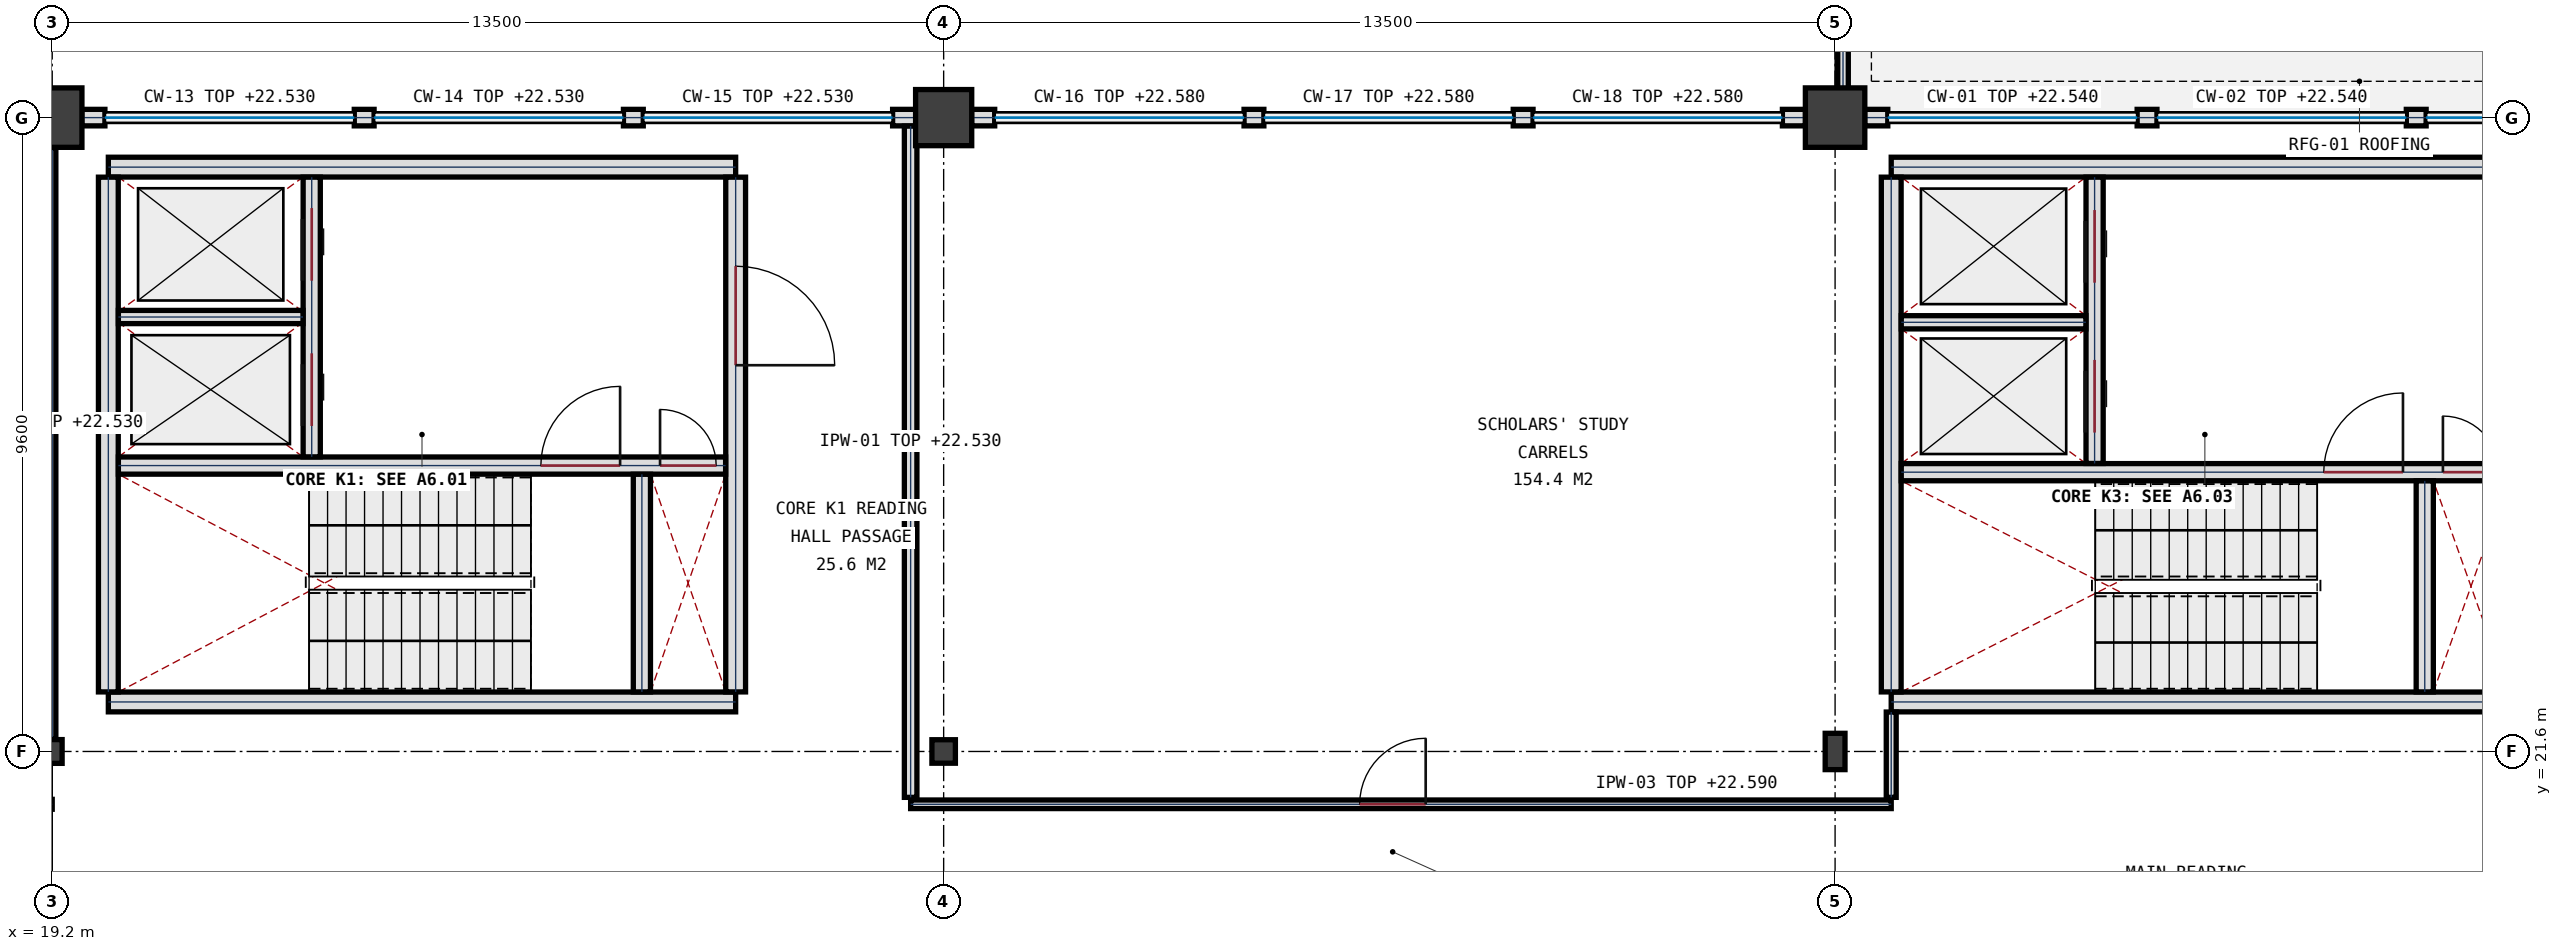
"""IFC4 building model, lengths in metres.
Left out: names, types, materials, properties, quantities, classifications, styles, units other than length and angle.
Written with IfcOpenShell. Run it as: python <this file> out.ifc"""

import sys

from ifc_helpers import new_model, si_unit, direction, frame, frame_2d, origin, origin_2d, place, context, subcontext, project, spatial, rectangle, circle, hollow_circle, i_section, extrude, element, fill, save


model = new_model("IFC4")
c1 = context("Model", 3, precision=1e-05, world=origin(), true_north=direction((0.0, 1.0)))
c2 = subcontext(c1, "Body", "Model", "MODEL_VIEW")
j1 = project(units=[si_unit("LENGTHUNIT", "METRE"), si_unit("PLANEANGLEUNIT", "RADIAN")], contexts=[c1])
p1 = place(None, origin())
s1 = spatial("IfcSite", under=j1, at=p1, CompositionType="ELEMENT")
p2 = place(p1, origin())
s2 = spatial("IfcBuilding", under=s1, at=p2, CompositionType="ELEMENT")
p3 = place(p2, frame((0.0, 0.0, 18.9)))
s3 = spatial("IfcBuildingStorey", under=s2, at=p3, CompositionType="ELEMENT", Elevation=18.9)
p4 = place(p3, frame((19.2, 21.6, 0.0), z_axis=(0.0, 0.0, 1.0), x_axis=(1.0, 0.0, 0.0)))
e1 = element("IfcColumn", 1, at=p4, inside=s3, PredefinedType="COLUMN", context=c2, shape_type="SweptSolid", body=[
    extrude(i_section(OverallWidth=0.3, OverallDepth=0.36, WebThickness=0.012, FlangeThickness=0.022, FilletRadius=0.027, at=origin_2d()), origin(), (0.0, 0.0, 1.0), 4.5),
])
p5 = place(p3, frame((19.2, 31.2, 0.0), z_axis=(0.0, 0.0, 1.0), x_axis=(1.0, 0.0, 0.0)))
e2 = element("IfcColumn", 2, at=p5, inside=s3, PredefinedType="COLUMN", context=c2, shape_type="SweptSolid", body=[
    extrude(circle(Radius=0.45, at=origin_2d()), origin(), (0.0, 0.0, 1.0), 4.5),
])
p6 = place(p3, frame((32.7, 21.6, 0.0), z_axis=(0.0, 0.0, 1.0), x_axis=(1.0, 0.0, 0.0)))
e3 = element("IfcColumn", 3, at=p6, inside=s3, PredefinedType="COLUMN", context=c2, shape_type="SweptSolid", body=[
    extrude(hollow_circle(Radius=0.178, WallThickness=0.014, at=origin_2d()), origin(), (0.0, 0.0, 1.0), 4.5),
])
p7 = place(p3, frame((32.7, 31.2, 0.0), z_axis=(0.0, 0.0, 1.0), x_axis=(1.0, 0.0, 0.0)))
e4 = element("IfcColumn", 4, at=p7, inside=s3, PredefinedType="COLUMN", context=c2, shape_type="SweptSolid", body=[
    extrude(rectangle(XDim=0.85, YDim=0.85, at=origin_2d()), origin(), (0.0, 0.0, 1.0), 4.5),
])
p8 = place(p3, frame((46.2, 21.6, 0.0), z_axis=(0.0, 0.0, 1.0), x_axis=(1.0, 0.0, 0.0)))
e5 = element("IfcColumn", 5, at=p8, inside=s3, PredefinedType="COLUMN", context=c2, shape_type="SweptSolid", body=[
    extrude(i_section(OverallWidth=0.3, OverallDepth=0.55, WebThickness=0.015, FlangeThickness=0.029, FilletRadius=0.027, at=origin_2d()), origin(), (0.0, 0.0, 1.0), 4.5),
])
p9 = place(p3, frame((46.2, 31.2, 0.0), z_axis=(0.0, 0.0, 1.0), x_axis=(1.0, 0.0, 0.0)))
e6 = element("IfcColumn", 6, at=p9, inside=s3, PredefinedType="COLUMN", context=c2, shape_type="SweptSolid", body=[
    extrude(circle(Radius=0.45, at=origin_2d()), origin(), (0.0, 0.0, 1.0), 4.5),
])
for number, where, z_axis, x_axis in (
    (7, (19.648, 31.2, 0.0), (0.0, 0.0, 1.0), (1.0, 0.0, 0.0)),
    (8, (31.927, 31.2, 0.0), (0.0, 0.0, 1.0), (1.0, 0.0, 0.0)),
):
    element("IfcWall", number, at=place(p3, frame(where, z_axis=z_axis, x_axis=x_axis)), inside=s3, PredefinedType="SOLIDWALL", context=c2, shape_type="SweptSolid", body=[
        extrude(rectangle(XDim=0.35, YDim=0.25, at=frame_2d((0.175, 0.0))), origin(), (0.0, 0.0, 1.0), 3.63),
    ])
p10 = place(p3, frame((23.774, 31.2, 0.0), z_axis=(0.0, 0.0, 1.0), x_axis=(1.0, 0.0, 0.0)))
e9 = element("IfcWall", 9, at=p10, inside=s3, PredefinedType="SOLIDWALL", context=c2, shape_type="SweptSolid", body=[
    extrude(rectangle(XDim=0.3, YDim=0.25, at=frame_2d((0.15, 0.0))), origin(), (0.0, 0.0, 1.0), 3.63),
])
p11 = place(p3, frame((27.851, 31.2, 0.0), z_axis=(0.0, 0.0, 1.0), x_axis=(1.0, 0.0, 0.0)))
e10 = element("IfcWall", 10, at=p11, inside=s3, PredefinedType="SOLIDWALL", context=c2, shape_type="SweptSolid", body=[
    extrude(rectangle(XDim=0.3, YDim=0.25, at=frame_2d((0.15, 0.0))), origin(), (0.0, 0.0, 1.0), 3.63),
])
for number, where, z_axis, x_axis in (
    (11, (33.123, 31.2, 0.0), (0.0, 0.0, 1.0), (1.0, 0.0, 0.0)),
    (12, (45.402, 31.2, 0.0), (0.0, 0.0, 1.0), (1.0, 0.0, 0.0)),
):
    element("IfcWall", number, at=place(p3, frame(where, z_axis=z_axis, x_axis=x_axis)), inside=s3, PredefinedType="SOLIDWALL", context=c2, shape_type="SweptSolid", body=[
        extrude(rectangle(XDim=0.35, YDim=0.25, at=frame_2d((0.175, 0.0))), origin(), (0.0, 0.0, 1.0), 3.68),
    ])
for number, where, z_axis, x_axis in (
    (13, (37.249, 31.2, 0.0), (0.0, 0.0, 1.0), (1.0, 0.0, 0.0)),
    (14, (41.326, 31.2, 0.0), (0.0, 0.0, 1.0), (1.0, 0.0, 0.0)),
):
    element("IfcWall", number, at=place(p3, frame(where, z_axis=z_axis, x_axis=x_axis)), inside=s3, PredefinedType="SOLIDWALL", context=c2, shape_type="SweptSolid", body=[
        extrude(rectangle(XDim=0.3, YDim=0.25, at=frame_2d((0.15, 0.0))), origin(), (0.0, 0.0, 1.0), 3.68),
    ])
p12 = place(p3, frame((46.648, 31.2, 0.0), z_axis=(0.0, 0.0, 1.0), x_axis=(1.0, 0.0, 0.0)))
e15 = element("IfcWall", 15, at=p12, inside=s3, PredefinedType="SOLIDWALL", context=c2, shape_type="SweptSolid", body=[
    extrude(rectangle(XDim=0.35, YDim=0.25, at=frame_2d((0.175, 0.0))), origin(), (0.0, 0.0, 1.0), 3.64),
])
p13 = place(p3, frame((50.774, 31.2, 0.0), z_axis=(0.0, 0.0, 1.0), x_axis=(1.0, 0.0, 0.0)))
e16 = element("IfcWall", 16, at=p13, inside=s3, PredefinedType="SOLIDWALL", context=c2, shape_type="SweptSolid", body=[
    extrude(rectangle(XDim=0.3, YDim=0.25, at=frame_2d((0.15, 0.0))), origin(), (0.0, 0.0, 1.0), 3.64),
])
p14 = place(p3, frame((54.851, 31.2, 0.0), z_axis=(0.0, 0.0, 1.0), x_axis=(1.0, 0.0, 0.0)))
e17 = element("IfcWall", 17, at=p14, inside=s3, PredefinedType="SOLIDWALL", context=c2, shape_type="SweptSolid", body=[
    extrude(rectangle(XDim=0.3, YDim=0.25, at=frame_2d((0.15, 0.0))), origin(), (0.0, 0.0, 1.0), 3.64),
])
p15 = place(p3, frame((46.32, 31.5, 0.0), z_axis=(0.0, 0.0, 1.0), x_axis=(0.0, 1.0, 0.0)))
e18 = element("IfcWall", 18, at=p15, inside=s3, PredefinedType="PARAPET", context=c2, shape_type="SweptSolid", body=[
    extrude(rectangle(XDim=16.2, YDim=0.16, at=frame_2d((8.1, 0.0))), origin(), (0.0, 0.0, 1.0), 1.15),
])
for number, where, z_axis, x_axis in (
    (19, (29.55, 22.35, 0.0), (0.0, 0.0, 1.0), (-1.0, 0.0, 0.0)),
    (20, (20.05, 30.45, 0.0), (0.0, 0.0, 1.0), (1.0, 0.0, 0.0)),
):
    element("IfcWall", number, at=place(p3, frame(where, z_axis=z_axis, x_axis=x_axis)), inside=s3, PredefinedType="SHEAR", context=c2, shape_type="SweptSolid", body=[
        extrude(rectangle(XDim=9.5, YDim=0.3, at=frame_2d((4.75, 0.0))), origin(), (0.0, 0.0, 1.0), 4.5),
    ])
p16 = place(p3, frame((20.05, 22.502, 0.0), z_axis=(0.0, 0.0, 1.0), x_axis=(0.0, 1.0, 0.0)))
e21 = element("IfcWall", 21, at=p16, inside=s3, PredefinedType="SHEAR", context=c2, shape_type="SweptSolid", body=[
    extrude(rectangle(XDim=7.796, YDim=0.3, at=frame_2d((3.898, 0.0))), origin(), (0.0, 0.0, 1.0), 4.5),
])
p17 = place(p3, frame((29.55, 30.298, 0.0), z_axis=(0.0, 0.0, 1.0), x_axis=(0.0, -1.0, 0.0)))
e22 = element("IfcWall", 22, at=p17, inside=s3, PredefinedType="SHEAR", context=c2, shape_type="SweptSolid", body=[
    extrude(rectangle(XDim=7.796, YDim=0.3, at=frame_2d((3.898, 0.0))), origin(), (0.0, 0.0, 1.0), 4.5),
])
p18 = place(p17, frame((1.348, 0.0, 0.0)))
e23 = element("IfcOpeningElement", 23, at=p18, cuts=e22, PredefinedType="OPENING", context=c2, shape_type="SweptSolid", body=[
    extrude(rectangle(XDim=1.5, YDim=2.25, at=frame_2d((0.75, 1.125))), frame((0.0, 0.16, 0.0), z_axis=(0.0, -1.0, 0.0), x_axis=(1.0, 0.0, 0.0)), (0.0, 0.0, 1.0), 0.32),
])
p19 = place(p3, frame((20.202, 25.93, 0.0), z_axis=(0.0, 0.0, 1.0), x_axis=(1.0, 0.0, 0.0)))
e24 = element("IfcWall", 24, at=p19, inside=s3, PredefinedType="SHEAR", context=c2, shape_type="SweptSolid", body=[
    extrude(rectangle(XDim=9.196, YDim=0.26, at=frame_2d((4.598, 0.0))), origin(), (0.0, 0.0, 1.0), 4.5),
])
p20 = place(p19, frame((6.398, 0.0, 0.0)))
e25 = element("IfcOpeningElement", 25, at=p20, cuts=e24, PredefinedType="OPENING", context=c2, shape_type="SweptSolid", body=[
    extrude(rectangle(XDim=1.2, YDim=2.2, at=frame_2d((0.6, 1.1))), frame((0.0, 0.14, 0.0), z_axis=(0.0, -1.0, 0.0), x_axis=(1.0, 0.0, 0.0)), (0.0, 0.0, 1.0), 0.28),
])
p21 = place(p19, frame((8.203, 0.0, 0.0)))
e26 = element("IfcOpeningElement", 26, at=p21, cuts=e24, PredefinedType="OPENING", context=c2, shape_type="SweptSolid", body=[
    extrude(rectangle(XDim=0.85, YDim=2.05, at=frame_2d((0.425, 1.025))), frame((0.0, 0.14, 0.0), z_axis=(0.0, -1.0, 0.0), x_axis=(1.0, 0.0, 0.0)), (0.0, 0.0, 1.0), 0.28),
])
p22 = place(p3, frame((28.13, 22.502, 0.0), z_axis=(0.0, 0.0, 1.0), x_axis=(0.0, 1.0, 0.0)))
e27 = element("IfcWall", 27, at=p22, inside=s3, PredefinedType="SHEAR", context=c2, shape_type="SweptSolid", body=[
    extrude(rectangle(XDim=3.296, YDim=0.26, at=frame_2d((1.648, 0.0))), origin(), (0.0, 0.0, 1.0), 4.5),
])
p23 = place(p3, frame((23.13, 26.062, 0.0), z_axis=(0.0, 0.0, 1.0), x_axis=(0.0, 1.0, 0.0)))
e28 = element("IfcWall", 28, at=p23, inside=s3, PredefinedType="SHEAR", context=c2, shape_type="SweptSolid", body=[
    extrude(rectangle(XDim=4.236, YDim=0.26, at=frame_2d((2.118, 0.0))), origin(), (0.0, 0.0, 1.0), 4.5),
])
p24 = place(p23, frame((0.468, 0.0, 0.0)))
e29 = element("IfcOpeningElement", 29, at=p24, cuts=e28, PredefinedType="OPENING", context=c2, shape_type="SweptSolid", body=[
    extrude(rectangle(XDim=1.1, YDim=2.15, at=frame_2d((0.55, 1.075))), frame((0.0, 0.14, 0.0), z_axis=(0.0, -1.0, 0.0), x_axis=(1.0, 0.0, 0.0)), (0.0, 0.0, 1.0), 0.28),
])
p25 = place(p23, frame((2.668, 0.0, 0.0)))
e30 = element("IfcOpeningElement", 30, at=p25, cuts=e28, PredefinedType="OPENING", context=c2, shape_type="SweptSolid", body=[
    extrude(rectangle(XDim=1.1, YDim=2.15, at=frame_2d((0.55, 1.075))), frame((0.0, 0.14, 0.0), z_axis=(0.0, -1.0, 0.0), x_axis=(1.0, 0.0, 0.0)), (0.0, 0.0, 1.0), 0.28),
])
p26 = place(p3, frame((20.202, 28.18, 0.0), z_axis=(0.0, 0.0, 1.0), x_axis=(1.0, 0.0, 0.0)))
e31 = element("IfcWall", 31, at=p26, inside=s3, PredefinedType="PLUMBINGWALL", context=c2, shape_type="SweptSolid", body=[
    extrude(rectangle(XDim=2.796, YDim=0.2, at=frame_2d((1.398, 0.0))), origin(), (0.0, 0.0, 1.0), 4.24),
])
for number, where, z_axis, x_axis in (
    (32, (56.55, 22.35, 0.0), (0.0, 0.0, 1.0), (-1.0, 0.0, 0.0)),
    (33, (47.05, 30.45, 0.0), (0.0, 0.0, 1.0), (1.0, 0.0, 0.0)),
):
    element("IfcWall", number, at=place(p3, frame(where, z_axis=z_axis, x_axis=x_axis)), inside=s3, PredefinedType="SHEAR", context=c2, shape_type="SweptSolid", body=[
        extrude(rectangle(XDim=9.5, YDim=0.3, at=frame_2d((4.75, 0.0))), origin(), (0.0, 0.0, 1.0), 4.5),
    ])
p27 = place(p3, frame((47.05, 22.502, 0.0), z_axis=(0.0, 0.0, 1.0), x_axis=(0.0, 1.0, 0.0)))
e34 = element("IfcWall", 34, at=p27, inside=s3, PredefinedType="SHEAR", context=c2, shape_type="SweptSolid", body=[
    extrude(rectangle(XDim=7.796, YDim=0.3, at=frame_2d((3.898, 0.0))), origin(), (0.0, 0.0, 1.0), 4.5),
])
p28 = place(p3, frame((47.202, 25.83, 0.0), z_axis=(0.0, 0.0, 1.0), x_axis=(1.0, 0.0, 0.0)))
e35 = element("IfcWall", 35, at=p28, inside=s3, PredefinedType="SHEAR", context=c2, shape_type="SweptSolid", body=[
    extrude(rectangle(XDim=9.196, YDim=0.26, at=frame_2d((4.598, 0.0))), origin(), (0.0, 0.0, 1.0), 4.5),
])
p29 = place(p28, frame((6.398, 0.0, 0.0)))
e36 = element("IfcOpeningElement", 36, at=p29, cuts=e35, PredefinedType="OPENING", context=c2, shape_type="SweptSolid", body=[
    extrude(rectangle(XDim=1.2, YDim=2.2, at=frame_2d((0.6, 1.1))), frame((0.0, 0.14, 0.0), z_axis=(0.0, -1.0, 0.0), x_axis=(1.0, 0.0, 0.0)), (0.0, 0.0, 1.0), 0.28),
])
p30 = place(p28, frame((8.203, 0.0, 0.0)))
e37 = element("IfcOpeningElement", 37, at=p30, cuts=e35, PredefinedType="OPENING", context=c2, shape_type="SweptSolid", body=[
    extrude(rectangle(XDim=0.85, YDim=2.05, at=frame_2d((0.425, 1.025))), frame((0.0, 0.14, 0.0), z_axis=(0.0, -1.0, 0.0), x_axis=(1.0, 0.0, 0.0)), (0.0, 0.0, 1.0), 0.28),
])
p31 = place(p3, frame((55.13, 22.502, 0.0), z_axis=(0.0, 0.0, 1.0), x_axis=(0.0, 1.0, 0.0)))
e38 = element("IfcWall", 38, at=p31, inside=s3, PredefinedType="SHEAR", context=c2, shape_type="SweptSolid", body=[
    extrude(rectangle(XDim=3.196, YDim=0.26, at=frame_2d((1.598, 0.0))), origin(), (0.0, 0.0, 1.0), 4.5),
])
p32 = place(p3, frame((50.13, 25.962, 0.0), z_axis=(0.0, 0.0, 1.0), x_axis=(0.0, 1.0, 0.0)))
e39 = element("IfcWall", 39, at=p32, inside=s3, PredefinedType="SHEAR", context=c2, shape_type="SweptSolid", body=[
    extrude(rectangle(XDim=4.336, YDim=0.26, at=frame_2d((2.168, 0.0))), origin(), (0.0, 0.0, 1.0), 4.5),
])
p33 = place(p32, frame((0.468, 0.0, 0.0)))
e40 = element("IfcOpeningElement", 40, at=p33, cuts=e39, PredefinedType="OPENING", context=c2, shape_type="SweptSolid", body=[
    extrude(rectangle(XDim=1.1, YDim=2.15, at=frame_2d((0.55, 1.075))), frame((0.0, 0.14, 0.0), z_axis=(0.0, -1.0, 0.0), x_axis=(1.0, 0.0, 0.0)), (0.0, 0.0, 1.0), 0.28),
])
p34 = place(p32, frame((2.738, 0.0, 0.0)))
e41 = element("IfcOpeningElement", 41, at=p34, cuts=e39, PredefinedType="OPENING", context=c2, shape_type="SweptSolid", body=[
    extrude(rectangle(XDim=1.1, YDim=2.15, at=frame_2d((0.55, 1.075))), frame((0.0, 0.14, 0.0), z_axis=(0.0, -1.0, 0.0), x_axis=(1.0, 0.0, 0.0)), (0.0, 0.0, 1.0), 0.28),
])
p35 = place(p3, frame((47.202, 28.1, 0.0), z_axis=(0.0, 0.0, 1.0), x_axis=(1.0, 0.0, 0.0)))
e42 = element("IfcWall", 42, at=p35, inside=s3, PredefinedType="PLUMBINGWALL", context=c2, shape_type="SweptSolid", body=[
    extrude(rectangle(XDim=2.796, YDim=0.2, at=frame_2d((1.398, 0.0))), origin(), (0.0, 0.0, 1.0), 4.24),
])
p36 = place(p3, frame((32.2, 20.8, 0.0), z_axis=(0.0, 0.0, 1.0), x_axis=(1.0, 0.0, 0.0)))
e43 = element("IfcWall", 43, at=p36, inside=s3, PredefinedType="PARTITIONING", context=c2, shape_type="SweptSolid", body=[
    extrude(rectangle(XDim=14.85, YDim=0.13, at=frame_2d((7.425, 0.0))), origin(), (0.0, 0.0, 1.0), 3.69),
])
p37 = place(p36, frame((6.8, 0.0, 0.0)))
e44 = element("IfcOpeningElement", 44, at=p37, cuts=e43, PredefinedType="OPENING", context=c2, shape_type="SweptSolid", body=[
    extrude(rectangle(XDim=1.0, YDim=2.2, at=frame_2d((0.5, 1.1))), frame((0.0, 0.075, 0.0), z_axis=(0.0, -1.0, 0.0), x_axis=(1.0, 0.0, 0.0)), (0.0, 0.0, 1.0), 0.15),
])
p38 = place(p3, frame((19.2, 21.783, 0.0), z_axis=(0.0, 0.0, 1.0), x_axis=(0.0, 1.0, 0.0)))
e45 = element("IfcWall", 45, at=p38, inside=s3, PredefinedType="PARTITIONING", context=c2, shape_type="SweptSolid", body=[
    extrude(rectangle(XDim=8.964, YDim=0.11, at=frame_2d((4.482, 0.0))), origin(), (0.0, 0.0, 1.0), 3.63),
])
p39 = place(p3, frame((32.2, 20.905, 0.0), z_axis=(0.0, 0.0, 1.0), x_axis=(0.0, 1.0, 0.0)))
e46 = element("IfcWall", 46, at=p39, inside=s3, PredefinedType="PARTITIONING", context=c2, shape_type="SweptSolid", body=[
    extrude(rectangle(XDim=10.166, YDim=0.19, at=frame_2d((5.083, 0.0))), origin(), (0.0, 0.0, 1.0), 3.63),
])
p40 = place(p3, frame((47.05, 20.905, 0.0), z_axis=(0.0, 0.0, 1.0), x_axis=(0.0, 1.0, 0.0)))
e47 = element("IfcWall", 47, at=p40, inside=s3, PredefinedType="PARTITIONING", context=c2, shape_type="SweptSolid", body=[
    extrude(rectangle(XDim=1.292, YDim=0.15, at=frame_2d((0.646, 0.0))), origin(), (0.0, 0.0, 1.0), 3.69),
])
p41 = place(p18, origin())
e48 = element("IfcDoor", 48, at=p41, inside=s3, OperationType="SINGLE_SWING_RIGHT", PredefinedType="DOOR", context=c2, shape_type="SweptSolid", body=[
    extrude(rectangle(XDim=1.5, YDim=2.25, at=frame_2d((0.75, 1.125))), frame((0.0, 0.032, 0.0), z_axis=(0.0, -1.0, 0.0), x_axis=(1.0, 0.0, 0.0)), (0.0, 0.0, 1.0), 0.065),
])
fill(e23, e48)
p42 = place(p20, origin())
e49 = element("IfcDoor", 49, at=p42, inside=s3, OperationType="SINGLE_SWING_RIGHT", PredefinedType="DOOR", context=c2, shape_type="SweptSolid", body=[
    extrude(rectangle(XDim=1.2, YDim=2.2, at=frame_2d((0.6, 1.1))), frame((0.0, 0.032, 0.0), z_axis=(0.0, -1.0, 0.0), x_axis=(1.0, 0.0, 0.0)), (0.0, 0.0, 1.0), 0.065),
])
fill(e25, e49)
p43 = place(p21, origin())
e50 = element("IfcDoor", 50, at=p43, inside=s3, OperationType="SINGLE_SWING_LEFT", PredefinedType="DOOR", context=c2, shape_type="SweptSolid", body=[
    extrude(rectangle(XDim=0.85, YDim=2.05, at=frame_2d((0.425, 1.025))), frame((0.0, 0.032, 0.0), z_axis=(0.0, -1.0, 0.0), x_axis=(1.0, 0.0, 0.0)), (0.0, 0.0, 1.0), 0.065),
])
fill(e26, e50)
p44 = place(p24, origin())
e51 = element("IfcDoor", 51, at=p44, inside=s3, OperationType="SLIDING_TO_LEFT", PredefinedType="DOOR", context=c2, shape_type="SweptSolid", body=[
    extrude(rectangle(XDim=1.1, YDim=2.15, at=frame_2d((0.55, 1.075))), frame((0.0, 0.032, 0.0), z_axis=(0.0, -1.0, 0.0), x_axis=(1.0, 0.0, 0.0)), (0.0, 0.0, 1.0), 0.065),
])
fill(e29, e51)
p45 = place(p25, origin())
e52 = element("IfcDoor", 52, at=p45, inside=s3, OperationType="SLIDING_TO_LEFT", PredefinedType="DOOR", context=c2, shape_type="SweptSolid", body=[
    extrude(rectangle(XDim=1.1, YDim=2.15, at=frame_2d((0.55, 1.075))), frame((0.0, 0.032, 0.0), z_axis=(0.0, -1.0, 0.0), x_axis=(1.0, 0.0, 0.0)), (0.0, 0.0, 1.0), 0.065),
])
fill(e30, e52)
p46 = place(p29, origin())
e53 = element("IfcDoor", 53, at=p46, inside=s3, OperationType="SINGLE_SWING_RIGHT", PredefinedType="DOOR", context=c2, shape_type="SweptSolid", body=[
    extrude(rectangle(XDim=1.2, YDim=2.2, at=frame_2d((0.6, 1.1))), frame((0.0, 0.032, 0.0), z_axis=(0.0, -1.0, 0.0), x_axis=(1.0, 0.0, 0.0)), (0.0, 0.0, 1.0), 0.065),
])
fill(e36, e53)
p47 = place(p30, origin())
e54 = element("IfcDoor", 54, at=p47, inside=s3, OperationType="SINGLE_SWING_LEFT", PredefinedType="DOOR", context=c2, shape_type="SweptSolid", body=[
    extrude(rectangle(XDim=0.85, YDim=2.05, at=frame_2d((0.425, 1.025))), frame((0.0, 0.032, 0.0), z_axis=(0.0, -1.0, 0.0), x_axis=(1.0, 0.0, 0.0)), (0.0, 0.0, 1.0), 0.065),
])
fill(e37, e54)
p48 = place(p33, origin())
e55 = element("IfcDoor", 55, at=p48, inside=s3, OperationType="SLIDING_TO_LEFT", PredefinedType="DOOR", context=c2, shape_type="SweptSolid", body=[
    extrude(rectangle(XDim=1.1, YDim=2.15, at=frame_2d((0.55, 1.075))), frame((0.0, 0.032, 0.0), z_axis=(0.0, -1.0, 0.0), x_axis=(1.0, 0.0, 0.0)), (0.0, 0.0, 1.0), 0.065),
])
fill(e40, e55)
p49 = place(p34, origin())
e56 = element("IfcDoor", 56, at=p49, inside=s3, OperationType="SLIDING_TO_LEFT", PredefinedType="DOOR", context=c2, shape_type="SweptSolid", body=[
    extrude(rectangle(XDim=1.1, YDim=2.15, at=frame_2d((0.55, 1.075))), frame((0.0, 0.032, 0.0), z_axis=(0.0, -1.0, 0.0), x_axis=(1.0, 0.0, 0.0)), (0.0, 0.0, 1.0), 0.065),
])
fill(e41, e56)
p50 = place(p37, origin())
e57 = element("IfcDoor", 57, at=p50, inside=s3, OperationType="SINGLE_SWING_RIGHT", PredefinedType="DOOR", context=c2, shape_type="SweptSolid", body=[
    extrude(rectangle(XDim=1.0, YDim=2.2, at=frame_2d((0.5, 1.1))), frame((0.0, 0.032, 0.0), z_axis=(0.0, -1.0, 0.0), x_axis=(1.0, 0.0, 0.0)), (0.0, 0.0, 1.0), 0.065),
])
fill(e44, e57)
save(model, sys.argv[1])
